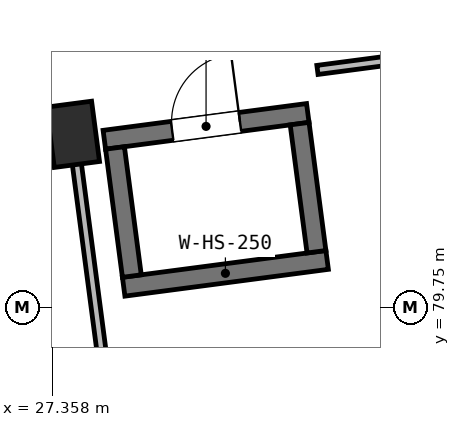
"""IFC4 building model, lengths in metres.
Left out: names, types, materials, properties, quantities, classifications, styles, units other than length and angle.
Written with IfcOpenShell. Run it as: python <this file> out.ifc"""

import sys

from ifc_helpers import new_model, si_unit, direction, frame, frame_2d, origin, origin_2d, place, context, subcontext, project, spatial, rectangle, extrude, element, fill, save


model = new_model("IFC4")
c1 = context("Model", 3, precision=1e-05, world=origin(), true_north=direction((0.0, 1.0)))
c2 = subcontext(c1, "Body", "Model", "MODEL_VIEW")
j1 = project(units=[si_unit("LENGTHUNIT", "METRE"), si_unit("PLANEANGLEUNIT", "RADIAN")], contexts=[c1])
p1 = place(None, origin())
s1 = spatial("IfcSite", under=j1, at=p1, CompositionType="ELEMENT")
p2 = place(p1, origin())
s2 = spatial("IfcBuilding", under=s1, at=p2, CompositionType="ELEMENT")
p3 = place(p2, origin())
s3 = spatial("IfcBuildingStorey", under=s2, at=p3, CompositionType="ELEMENT", Elevation=0.0)
p4 = place(p3, frame((27.631, 82.031, -0.35), z_axis=(0.0, 0.0, 1.0), x_axis=(0.991444861374, 0.13052619222, 0.0)))
e1 = element("IfcColumn", 1, at=p4, inside=s3, PredefinedType="COLUMN", context=c2, shape_type="SweptSolid", body=[
    extrude(rectangle(XDim=0.6, YDim=0.8, at=origin_2d()), origin(), (0.0, 0.0, 1.0), 4.85),
])
p5 = place(p3, frame((28.299, 80.025, -0.35), z_axis=(0.0, 0.0, 1.0), x_axis=(0.991438283356, 0.130576147498, 0.0)))
e2 = element("IfcWall", 2, at=p5, inside=s3, PredefinedType="SHEAR", context=c2, shape_type="SweptSolid", body=[
    extrude(rectangle(XDim=2.7, YDim=0.25, at=frame_2d((1.35, 0.0))), origin(), (0.0, 0.0, 1.0), 4.85),
])
p6 = place(p3, frame((28.044, 81.959, -0.35), z_axis=(0.0, 0.0, 1.0), x_axis=(0.991439824936, 0.130564442062, 0.0)))
e3 = element("IfcWall", 3, at=p6, inside=s3, PredefinedType="SHEAR", context=c2, shape_type="SweptSolid", body=[
    extrude(rectangle(XDim=2.7, YDim=0.25, at=frame_2d((1.35, 0.0))), origin(), (0.0, 0.0, 1.0), 4.85),
])
p7 = place(p6, frame((0.9, 0.0, 0.35)))
e4 = element("IfcOpeningElement", 4, at=p7, cuts=e3, PredefinedType="OPENING", context=c2, shape_type="SweptSolid", body=[
    extrude(rectangle(XDim=0.9, YDim=2.05, at=frame_2d((0.45, 1.025))), frame((0.0, 0.14, 0.0), z_axis=(0.0, -1.0, 0.0), x_axis=(1.0, 0.0, 0.0)), (0.0, 0.0, 1.0), 0.28),
])
p8 = place(p3, frame((28.406, 80.166, -0.35), z_axis=(0.0, 0.0, 1.0), x_axis=(-0.130413643681, 0.991459672171, 0.0)))
e5 = element("IfcWall", 5, at=p8, inside=s3, PredefinedType="SHEAR", context=c2, shape_type="SweptSolid", body=[
    extrude(rectangle(XDim=1.7, YDim=0.25, at=frame_2d((0.85, 0.0))), origin(), (0.0, 0.0, 1.0), 4.85),
])
p9 = place(p3, frame((30.835, 80.486, -0.35), z_axis=(0.0, 0.0, 1.0), x_axis=(-0.1305548243, 0.991441091468, 0.0)))
e6 = element("IfcWall", 6, at=p9, inside=s3, PredefinedType="SHEAR", context=c2, shape_type="SweptSolid", body=[
    extrude(rectangle(XDim=1.7, YDim=0.25, at=frame_2d((0.85, 0.0))), origin(), (0.0, 0.0, 1.0), 4.85),
])
p10 = place(p3, frame((30.848, 82.878, 0.0), z_axis=(0.0, 0.0, 1.0), x_axis=(0.991441907417, 0.13054862779, 0.0)))
e7 = element("IfcWall", 7, at=p10, inside=s3, PredefinedType="PARTITIONING", context=c2, shape_type="SweptSolid", body=[
    extrude(rectangle(XDim=5.1, YDim=0.12, at=frame_2d((2.55, 0.0))), origin(), (0.0, 0.0, 1.0), 4.22),
])
p11 = place(p10, frame((1.1, 0.0, 0.0)))
e8 = element("IfcOpeningElement", 8, at=p11, cuts=e7, PredefinedType="OPENING", context=c2, shape_type="SweptSolid", body=[
    extrude(rectangle(XDim=0.88, YDim=2.1, at=frame_2d((0.44, 1.05))), frame((0.0, 0.075, 0.0), z_axis=(0.0, -1.0, 0.0), x_axis=(1.0, 0.0, 0.0)), (0.0, 0.0, 1.0), 0.15),
])
p12 = place(p3, frame((28.319, 76.806, 0.0), z_axis=(0.0, 0.0, 1.0), x_axis=(-0.130522269222, 0.991445377838, 0.0)))
e9 = element("IfcWall", 9, at=p12, inside=s3, PredefinedType="PARTITIONING", context=c2, shape_type="SweptSolid", body=[
    extrude(rectangle(XDim=4.94, YDim=0.12, at=frame_2d((2.47, 0.0))), origin(), (0.0, 0.0, 1.0), 3.32),
])
p13 = place(p7, origin())
e10 = element("IfcDoor", 10, at=p13, inside=s3, OperationType="SINGLE_SWING_RIGHT", PredefinedType="DOOR", context=c2, shape_type="SweptSolid", body=[
    extrude(rectangle(XDim=0.9, YDim=2.05, at=frame_2d((0.45, 1.025))), frame((0.0, 0.025, 0.0), z_axis=(0.0, -1.0, 0.0), x_axis=(1.0, 0.0, 0.0)), (0.0, 0.0, 1.0), 0.05),
])
fill(e4, e10)
save(model, sys.argv[1])
